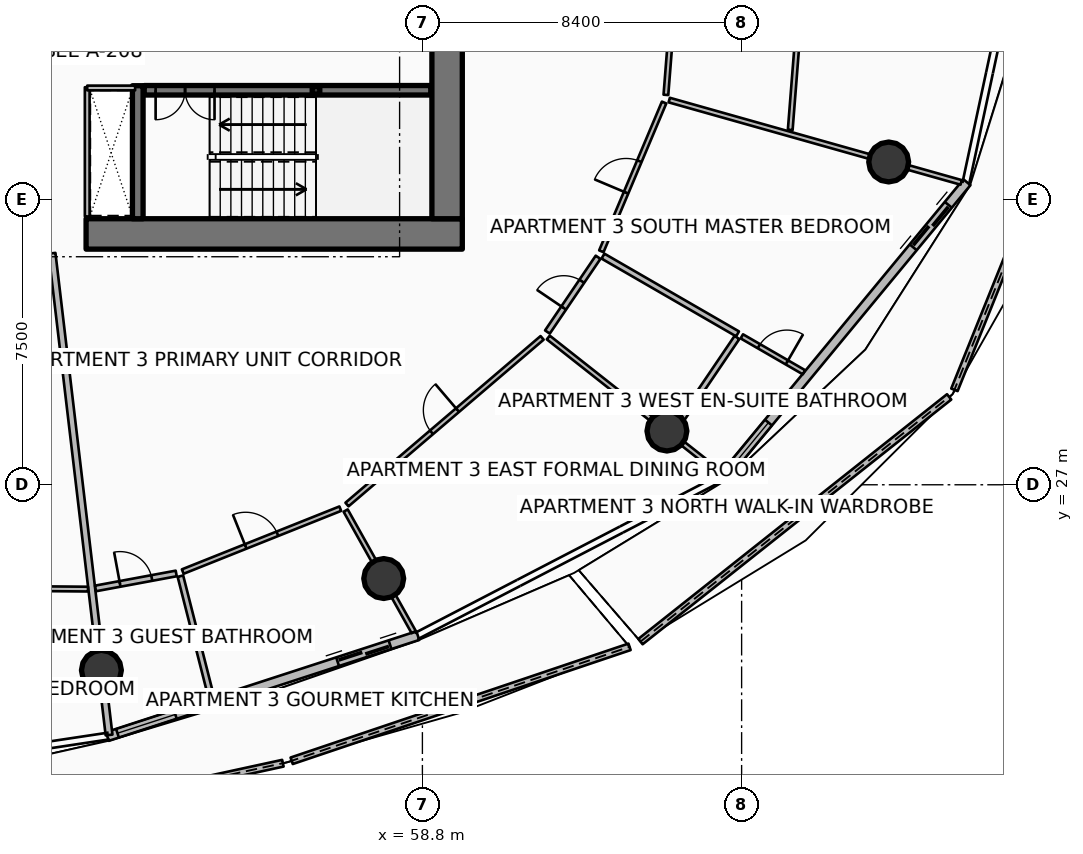
"""IFC4 building model, lengths in metres.
Left out: names, types, materials, properties, quantities, classifications, styles, units other than length and angle.
Written with IfcOpenShell. Run it as: python <this file> out.ifc"""

import sys

from ifc_helpers import new_model, si_unit, direction, frame, frame_2d, origin, origin_2d, place, context, subcontext, project, spatial, polyline, rectangle, hollow_rectangle, circle, outline, extrude, element, fill, save


model = new_model("IFC4")
c1 = context("Model", 3, precision=1e-05, world=origin(), true_north=direction((0.0, 1.0)))
c2 = subcontext(c1, "Body", "Model", "MODEL_VIEW")
j1 = project(units=[si_unit("LENGTHUNIT", "METRE"), si_unit("PLANEANGLEUNIT", "RADIAN")], contexts=[c1])
p1 = place(None, origin())
s1 = spatial("IfcSite", under=j1, at=p1, CompositionType="ELEMENT")
p2 = place(p1, origin())
s2 = spatial("IfcBuilding", under=s1, at=p2, CompositionType="ELEMENT")
p3 = place(p2, frame((0.0, 0.0, 157.8)))
s3 = spatial("IfcBuildingStorey", under=s2, at=p3, CompositionType="ELEMENT", Elevation=157.8)
p4 = place(p3, frame((49.95, 33.6, 0.0), z_axis=(0.0, 0.0, 1.0), x_axis=(1.0, 0.0, 0.0)))
e1 = element("IfcWall", 1, at=p4, inside=s3, PredefinedType="SHEAR", context=c2, shape_type="SweptSolid", body=[
    extrude(rectangle(XDim=9.9, YDim=0.8, at=frame_2d((4.95, 0.0))), origin(), (0.0, 0.0, 1.0), 3.75),
])
p5 = place(p3, frame((59.45, 34.0, 0.0), z_axis=(0.0, 0.0, 1.0), x_axis=(0.0, 1.0, 0.0)))
e2 = element("IfcWall", 2, at=p5, inside=s3, PredefinedType="SHEAR", context=c2, shape_type="SweptSolid", body=[
    extrude(rectangle(XDim=16.0, YDim=0.8, at=frame_2d((8.0, 0.0))), origin(), (0.0, 0.0, 1.0), 3.75),
])
p6 = place(p3, frame((51.31, 34.0, 0.0), z_axis=(0.0, 0.0, 1.0), x_axis=(0.0, 1.0, 0.0)))
e3 = element("IfcWall", 3, at=p6, inside=s3, PredefinedType="SHEAR", context=c2, shape_type="SweptSolid", body=[
    extrude(rectangle(XDim=3.5, YDim=0.28, at=frame_2d((1.75, 0.0))), origin(), (0.0, 0.0, 1.0), 3.75),
])
p7 = place(p3, frame((56.0, 37.38, 0.0), z_axis=(0.0, 0.0, 1.0), x_axis=(1.0, 0.0, 0.0)))
e4 = element("IfcColumn", 4, at=p7, inside=s3, PredefinedType="COLUMN", context=c2, shape_type="SweptSolid", body=[
    extrude(hollow_rectangle(XDim=0.2, YDim=0.2, WallThickness=0.01, InnerFilletRadius=0.01, OuterFilletRadius=0.02, at=origin_2d()), origin(), (0.0, 0.0, 1.0), 1.67),
])
for number, where, z_axis, x_axis in (
    (5, (50.353, 22.119, 0.0), (0.0, 0.0, 1.0), (1.0, 0.0, 0.0)),
    (6, (57.782, 24.533, 0.0), (0.0, 0.0, 1.0), (1.0, 0.0, 0.0)),
    (7, (65.234, 28.414, 0.0), (0.0, 0.0, 1.0), (1.0, 0.0, 0.0)),
    (8, (71.07, 35.494, 0.0), (0.0, 0.0, 1.0), (1.0, 0.0, 0.0)),
):
    element("IfcColumn", number, at=place(p3, frame(where, z_axis=z_axis, x_axis=x_axis)), inside=s3, PredefinedType="COLUMN", context=c2, shape_type="SweptSolid", body=[
        extrude(circle(Radius=0.525, at=origin_2d()), origin(), (0.0, 0.0, 1.0), 3.5),
    ])
p8 = place(p3, frame((46.24, 17.741, 0.0), z_axis=(0.0, 0.0, 1.0), x_axis=(0.977181934864, 0.212404016384, 0.0)))
e9 = element("IfcWall", 9, at=p8, inside=s3, PredefinedType="PARAPET", context=c2, shape_type="SweptSolid", body=[
    extrude(outline(polyline([(0.0, 0.0), (9.096, 0.0), (9.096, 1.348), (4.548, 1.182), (0.0, 1.12), (0.0, 0.0)])), frame((0.0, 0.09, 0.0), z_axis=(0.0, -1.0, 0.0), x_axis=(1.0, 0.0, 0.0)), (0.0, 0.0, 1.0), 0.18),
])
p9 = place(p3, frame((55.36, 19.737, 0.0), z_axis=(0.0, 0.0, 1.0), x_axis=(0.947571676397, 0.319543296113, 0.0)))
e10 = element("IfcWall", 10, at=p9, inside=s3, PredefinedType="PARAPET", context=c2, shape_type="SweptSolid", body=[
    extrude(outline(polyline([(0.0, 0.0), (9.383, 0.0), (9.383, 1.747), (4.691, 1.562), (0.0, 1.348), (0.0, 0.0)])), frame((0.0, 0.09, 0.0), z_axis=(0.0, -1.0, 0.0), x_axis=(1.0, 0.0, 0.0)), (0.0, 0.0, 1.0), 0.18),
])
p10 = place(p3, frame((64.539, 22.874, 0.0), z_axis=(0.0, 0.0, 1.0), x_axis=(0.783643972098, 0.621210209989, 0.0)))
e11 = element("IfcWall", 11, at=p10, inside=s3, PredefinedType="PARAPET", context=c2, shape_type="SweptSolid", body=[
    extrude(outline(polyline([(0.0, 0.0), (10.365, 0.0), (10.365, 1.832), (5.182, 1.853), (0.0, 1.756), (0.0, 0.0)])), frame((0.0, 0.09, 0.0), z_axis=(0.0, -1.0, 0.0), x_axis=(1.0, 0.0, 0.0)), (0.0, 0.0, 1.0), 0.18),
])
p11 = place(p3, frame((72.8, 29.498, 0.0), z_axis=(0.0, 0.0, 1.0), x_axis=(0.373952087888, 0.927448023322, 0.0)))
e12 = element("IfcWall", 12, at=p11, inside=s3, PredefinedType="PARAPET", context=c2, shape_type="SweptSolid", body=[
    extrude(outline(polyline([(0.0, 0.0), (10.84, 0.0), (10.84, 1.497), (5.42, 1.696), (0.0, 1.832), (0.0, 0.0)])), frame((0.0, 0.09, 0.0), z_axis=(0.0, -1.0, 0.0), x_axis=(1.0, 0.0, 0.0)), (0.0, 0.0, 1.0), 0.18),
])
p12 = place(p3, frame((50.51, 20.376, 0.0), z_axis=(0.0, 0.0, 1.0), x_axis=(0.951046390632, 0.309048156224, 0.0)))
e13 = element("IfcWall", 13, at=p12, inside=s3, PredefinedType="SOLIDWALL", context=c2, shape_type="SweptSolid", body=[
    extrude(rectangle(XDim=8.59, YDim=0.24, at=frame_2d((4.295, 0.0))), origin(), (0.0, 0.0, 1.0), 2.45),
])
p13 = place(p12, frame((6.37, 0.0, 0.0)))
e14 = element("IfcOpeningElement", 14, at=p13, cuts=e13, PredefinedType="OPENING", context=c2, shape_type="SweptSolid", body=[
    extrude(rectangle(XDim=1.45, YDim=2.15, at=frame_2d((0.725, 1.075))), frame((0.0, 0.13, 0.0), z_axis=(0.0, -1.0, 0.0), x_axis=(1.0, 0.0, 0.0)), (0.0, 0.0, 1.0), 0.26),
])
p14 = place(p12, frame((0.28, 0.0, 0.65)))
e15 = element("IfcOpeningElement", 15, at=p14, cuts=e13, PredefinedType="OPENING", context=c2, shape_type="SweptSolid", body=[
    extrude(rectangle(XDim=1.6, YDim=1.5, at=frame_2d((0.8, 0.75))), frame((0.0, 0.13, 0.0), z_axis=(0.0, -1.0, 0.0), x_axis=(1.0, 0.0, 0.0)), (0.0, 0.0, 1.0), 0.26),
])
p15 = place(p3, frame((66.709, 27.187, 0.0), z_axis=(0.0, 0.0, 1.0), x_axis=(0.636771922292, 0.77105221547, 0.0)))
e16 = element("IfcWall", 16, at=p15, inside=s3, PredefinedType="SOLIDWALL", context=c2, shape_type="SweptSolid", body=[
    extrude(rectangle(XDim=10.082, YDim=0.24, at=frame_2d((5.041, 0.0))), origin(), (0.0, 0.0, 1.0), 2.45),
])
p16 = place(p15, frame((7.862, 0.0, 0.0)))
e17 = element("IfcOpeningElement", 17, at=p16, cuts=e16, PredefinedType="OPENING", context=c2, shape_type="SweptSolid", body=[
    extrude(rectangle(XDim=1.45, YDim=2.15, at=frame_2d((0.725, 1.075))), frame((0.0, 0.13, 0.0), z_axis=(0.0, -1.0, 0.0), x_axis=(1.0, 0.0, 0.0)), (0.0, 0.0, 1.0), 0.26),
])
p17 = place(p15, frame((0.28, 0.0, 0.65)))
e18 = element("IfcOpeningElement", 18, at=p17, cuts=e16, PredefinedType="OPENING", context=c2, shape_type="SweptSolid", body=[
    extrude(rectangle(XDim=1.6, YDim=1.5, at=frame_2d((0.8, 0.75))), frame((0.0, 0.13, 0.0), z_axis=(0.0, -1.0, 0.0), x_axis=(1.0, 0.0, 0.0)), (0.0, 0.0, 1.0), 0.26),
])
p18 = place(p3, frame((51.48, 37.38, 0.0), z_axis=(0.0, 0.0, 1.0), x_axis=(1.0, 0.0, 0.0)))
e19 = element("IfcWall", 19, at=p18, inside=s3, PredefinedType="SOLIDWALL", context=c2, shape_type="SweptSolid", body=[
    extrude(rectangle(XDim=7.54, YDim=0.25, at=frame_2d((3.77, 0.0))), origin(), (0.0, 0.0, 1.0), 3.5),
])
p19 = place(p18, frame((0.3, 0.0, 0.0)))
e20 = element("IfcOpeningElement", 20, at=p19, cuts=e19, PredefinedType="OPENING", context=c2, shape_type="SweptSolid", body=[
    extrude(rectangle(XDim=1.55, YDim=2.15, at=frame_2d((0.775, 1.075))), frame((0.0, 0.135, 0.0), z_axis=(0.0, -1.0, 0.0), x_axis=(1.0, 0.0, 0.0)), (0.0, 0.0, 1.0), 0.27),
])
p20 = place(p3, frame((49.98, 34.06, 0.0), z_axis=(0.0, 0.0, 1.0), x_axis=(0.0, 1.0, 0.0)))
e21 = element("IfcWall", 21, at=p20, inside=s3, PredefinedType="PARTITIONING", context=c2, shape_type="SweptSolid", body=[
    extrude(rectangle(XDim=3.4, YDim=0.125, at=frame_2d((1.7, 0.0))), origin(), (0.0, 0.0, 1.0), 2.94),
])
p21 = place(p3, frame((49.98, 37.44, 0.0), z_axis=(0.0, 0.0, 1.0), x_axis=(1.0, 0.0, 0.0)))
e22 = element("IfcWall", 22, at=p21, inside=s3, PredefinedType="PARTITIONING", context=c2, shape_type="SweptSolid", body=[
    extrude(rectangle(XDim=1.26, YDim=0.125, at=frame_2d((0.63, 0.0))), origin(), (0.0, 0.0, 1.0), 2.94),
])
p22 = place(p3, frame((49.054, 33.091, 0.0), z_axis=(0.0, 0.0, 1.0), x_axis=(0.117543744731, -0.993067705685, 0.0)))
e23 = element("IfcWall", 23, at=p22, inside=s3, PredefinedType="PARTITIONING", context=c2, shape_type="SweptSolid", body=[
    extrude(rectangle(XDim=12.763, YDim=0.18, at=frame_2d((6.382, 0.0))), origin(), (0.0, 0.0, 1.0), 2.94),
])
p23 = place(p3, frame((45.687, 24.29, 0.0), z_axis=(0.0, 0.0, 1.0), x_axis=(0.999965854942, -0.008263712844, 0.0)))
e24 = element("IfcWall", 24, at=p23, inside=s3, PredefinedType="PARTITIONING", context=c2, shape_type="SweptSolid", body=[
    extrude(rectangle(XDim=4.313, YDim=0.125, at=frame_2d((2.157, 0.0))), origin(), (0.0, 0.0, 1.0), 2.94),
])
p24 = place(p23, frame((1.707, 0.0, 0.0)))
e25 = element("IfcOpeningElement", 25, at=p24, cuts=e24, PredefinedType="OPENING", context=c2, shape_type="SweptSolid", body=[
    extrude(rectangle(XDim=0.9, YDim=2.08, at=frame_2d((0.45, 1.04))), frame((0.0, 0.073, 0.0), z_axis=(0.0, -1.0, 0.0), x_axis=(1.0, 0.0, 0.0)), (0.0, 0.0, 1.0), 0.145),
])
p25 = place(p3, frame((50.199, 24.272, 0.0), z_axis=(0.0, 0.0, 1.0), x_axis=(0.98320468223, 0.182506309042, 0.0)))
e26 = element("IfcWall", 26, at=p25, inside=s3, PredefinedType="PARTITIONING", context=c2, shape_type="SweptSolid", body=[
    extrude(rectangle(XDim=2.159, YDim=0.15, at=frame_2d((1.08, 0.0))), origin(), (0.0, 0.0, 1.0), 2.94),
])
p26 = place(p25, frame((0.655, 0.0, 0.0)))
e27 = element("IfcOpeningElement", 27, at=p26, cuts=e26, PredefinedType="OPENING", context=c2, shape_type="SweptSolid", body=[
    extrude(rectangle(XDim=0.85, YDim=2.06, at=frame_2d((0.425, 1.03))), frame((0.0, 0.085, 0.0), z_axis=(0.0, -1.0, 0.0), x_axis=(1.0, 0.0, 0.0)), (0.0, 0.0, 1.0), 0.17),
])
p27 = place(p3, frame((52.432, 24.595, 0.0), z_axis=(0.0, 0.0, 1.0), x_axis=(0.246779038105, -0.969071775645, 0.0)))
e28 = element("IfcWall", 28, at=p27, inside=s3, PredefinedType="PARTITIONING", context=c2, shape_type="SweptSolid", body=[
    extrude(rectangle(XDim=3.301, YDim=0.15, at=frame_2d((1.651, 0.0))), origin(), (0.0, 0.0, 1.0), 2.94),
])
p28 = place(p3, frame((52.494, 24.716, 0.0), z_axis=(0.0, 0.0, 1.0), x_axis=(0.928695316587, 0.370843644882, 0.0)))
e29 = element("IfcWall", 29, at=p28, inside=s3, PredefinedType="PARTITIONING", context=c2, shape_type="SweptSolid", body=[
    extrude(rectangle(XDim=4.464, YDim=0.125, at=frame_2d((2.232, 0.0))), origin(), (0.0, 0.0, 1.0), 2.94),
])
p29 = place(p28, frame((1.782, 0.0, 0.0)))
e30 = element("IfcOpeningElement", 30, at=p29, cuts=e29, PredefinedType="OPENING", context=c2, shape_type="SweptSolid", body=[
    extrude(rectangle(XDim=0.9, YDim=2.08, at=frame_2d((0.45, 1.04))), frame((0.0, 0.073, 0.0), z_axis=(0.0, -1.0, 0.0), x_axis=(1.0, 0.0, 0.0)), (0.0, 0.0, 1.0), 0.145),
])
p30 = place(p3, frame((56.781, 26.321, 0.0), z_axis=(0.0, 0.0, 1.0), x_axis=(0.488615541235, -0.872499199348, 0.0)))
e31 = element("IfcWall", 31, at=p30, inside=s3, PredefinedType="PARTITIONING", context=c2, shape_type="SweptSolid", body=[
    extrude(rectangle(XDim=3.665, YDim=0.125, at=frame_2d((1.832, 0.0))), origin(), (0.0, 0.0, 1.0), 2.94),
])
p31 = place(p3, frame((56.815, 26.48, 0.0), z_axis=(0.0, 0.0, 1.0), x_axis=(0.760406411553, 0.649447526186, 0.0)))
e32 = element("IfcWall", 32, at=p31, inside=s3, PredefinedType="PARTITIONING", context=c2, shape_type="SweptSolid", body=[
    extrude(rectangle(XDim=6.753, YDim=0.125, at=frame_2d((3.376, 0.0))), origin(), (0.0, 0.0, 1.0), 2.94),
])
p32 = place(p31, frame((2.926, 0.0, 0.0)))
e33 = element("IfcOpeningElement", 33, at=p32, cuts=e32, PredefinedType="OPENING", context=c2, shape_type="SweptSolid", body=[
    extrude(rectangle(XDim=0.9, YDim=2.08, at=frame_2d((0.45, 1.04))), frame((0.0, 0.073, 0.0), z_axis=(0.0, -1.0, 0.0), x_axis=(1.0, 0.0, 0.0)), (0.0, 0.0, 1.0), 0.145),
])
p33 = place(p3, frame((62.112, 30.875, 0.0), z_axis=(0.0, 0.0, 1.0), x_axis=(0.785328664081, -0.619079065526, 0.0)))
e34 = element("IfcWall", 34, at=p33, inside=s3, PredefinedType="PARTITIONING", context=c2, shape_type="SweptSolid", body=[
    extrude(rectangle(XDim=5.87, YDim=0.125, at=frame_2d((2.935, 0.0))), origin(), (0.0, 0.0, 1.0), 2.94),
])
p34 = place(p3, frame((62.09, 31.02, 0.0), z_axis=(0.0, 0.0, 1.0), x_axis=(0.561179778306, 0.827693938857, 0.0)))
e35 = element("IfcWall", 35, at=p34, inside=s3, PredefinedType="PARTITIONING", context=c2, shape_type="SweptSolid", body=[
    extrude(rectangle(XDim=2.376, YDim=0.15, at=frame_2d((1.188, 0.0))), origin(), (0.0, 0.0, 1.0), 2.94),
])
p35 = place(p34, frame((0.763, 0.0, 0.0)))
e36 = element("IfcOpeningElement", 36, at=p35, cuts=e35, PredefinedType="OPENING", context=c2, shape_type="SweptSolid", body=[
    extrude(rectangle(XDim=0.85, YDim=2.06, at=frame_2d((0.425, 1.03))), frame((0.0, 0.085, 0.0), z_axis=(0.0, -1.0, 0.0), x_axis=(1.0, 0.0, 0.0)), (0.0, 0.0, 1.0), 0.17),
])
p36 = place(p3, frame((65.404, 28.407, 0.0), z_axis=(0.0, 0.0, 1.0), x_axis=(0.561106969612, 0.827743298767, 0.0)))
e37 = element("IfcWall", 37, at=p36, inside=s3, PredefinedType="PARTITIONING", context=c2, shape_type="SweptSolid", body=[
    extrude(rectangle(XDim=2.982, YDim=0.15, at=frame_2d((1.491, 0.0))), origin(), (0.0, 0.0, 1.0), 2.94),
])
p37 = place(p3, frame((63.552, 33.016, 0.0), z_axis=(0.0, 0.0, 1.0), x_axis=(0.865897249189, -0.500221904605, 0.0)))
e38 = element("IfcWall", 38, at=p37, inside=s3, PredefinedType="PARTITIONING", context=c2, shape_type="SweptSolid", body=[
    extrude(rectangle(XDim=4.09, YDim=0.15, at=frame_2d((2.045, 0.0))), origin(), (0.0, 0.0, 1.0), 2.94),
])
p38 = place(p3, frame((67.206, 30.905, 0.0), z_axis=(0.0, 0.0, 1.0), x_axis=(0.865877522555, -0.500256050372, 0.0)))
e39 = element("IfcWall", 39, at=p38, inside=s3, PredefinedType="PARTITIONING", context=c2, shape_type="SweptSolid", body=[
    extrude(rectangle(XDim=1.888, YDim=0.125, at=frame_2d((0.944, 0.0))), origin(), (0.0, 0.0, 1.0), 2.94),
])
p39 = place(p38, frame((0.519, 0.0, 0.0)))
e40 = element("IfcOpeningElement", 40, at=p39, cuts=e39, PredefinedType="OPENING", context=c2, shape_type="SweptSolid", body=[
    extrude(rectangle(XDim=0.85, YDim=2.06, at=frame_2d((0.425, 1.03))), frame((0.0, 0.073, 0.0), z_axis=(0.0, -1.0, 0.0), x_axis=(1.0, 0.0, 0.0)), (0.0, 0.0, 1.0), 0.145),
])
p40 = place(p3, frame((63.509, 33.144, 0.0), z_axis=(0.0, 0.0, 1.0), x_axis=(0.38881485578, 0.921315911034, 0.0)))
e41 = element("IfcWall", 41, at=p40, inside=s3, PredefinedType="PARTITIONING", context=c2, shape_type="SweptSolid", body=[
    extrude(rectangle(XDim=4.248, YDim=0.125, at=frame_2d((2.124, 0.0))), origin(), (0.0, 0.0, 1.0), 2.94),
])
p41 = place(p40, frame((1.674, 0.0, 0.0)))
e42 = element("IfcOpeningElement", 42, at=p41, cuts=e41, PredefinedType="OPENING", context=c2, shape_type="SweptSolid", body=[
    extrude(rectangle(XDim=0.9, YDim=2.08, at=frame_2d((0.45, 1.04))), frame((0.0, 0.073, 0.0), z_axis=(0.0, -1.0, 0.0), x_axis=(1.0, 0.0, 0.0)), (0.0, 0.0, 1.0), 0.145),
])
p42 = place(p3, frame((65.295, 37.122, 0.0), z_axis=(0.0, 0.0, 1.0), x_axis=(0.962453364466, -0.271447087346, 0.0)))
e43 = element("IfcWall", 43, at=p42, inside=s3, PredefinedType="PARTITIONING", context=c2, shape_type="SweptSolid", body=[
    extrude(rectangle(XDim=7.981, YDim=0.125, at=frame_2d((3.991, 0.0))), origin(), (0.0, 0.0, 1.0), 2.94),
])
p43 = place(p3, frame((65.208, 37.259, 0.0), z_axis=(0.0, 0.0, 1.0), x_axis=(0.078457580711, 0.996917452966, 0.0)))
e44 = element("IfcWall", 44, at=p43, inside=s3, PredefinedType="PARTITIONING", context=c2, shape_type="SweptSolid", body=[
    extrude(rectangle(XDim=6.752, YDim=0.125, at=frame_2d((3.376, 0.0))), origin(), (0.0, 0.0, 1.0), 2.94),
])
p44 = place(p43, frame((2.926, 0.0, 0.0)))
e45 = element("IfcOpeningElement", 45, at=p44, cuts=e44, PredefinedType="OPENING", context=c2, shape_type="SweptSolid", body=[
    extrude(rectangle(XDim=0.9, YDim=2.08, at=frame_2d((0.45, 1.04))), frame((0.0, 0.073, 0.0), z_axis=(0.0, -1.0, 0.0), x_axis=(1.0, 0.0, 0.0)), (0.0, 0.0, 1.0), 0.145),
])
p45 = place(p3, frame((68.479, 36.336, 0.0), z_axis=(0.0, 0.0, 1.0), x_axis=(0.078482765766, 0.996915470578, 0.0)))
e46 = element("IfcWall", 46, at=p45, inside=s3, PredefinedType="PARTITIONING", context=c2, shape_type="SweptSolid", body=[
    extrude(rectangle(XDim=8.079, YDim=0.125, at=frame_2d((4.039, 0.0))), origin(), (0.0, 0.0, 1.0), 2.94),
])
p46 = place(p45, frame((3.589, 0.0, 0.0)))
e47 = element("IfcOpeningElement", 47, at=p46, cuts=e46, PredefinedType="OPENING", context=c2, shape_type="SweptSolid", body=[
    extrude(rectangle(XDim=0.9, YDim=2.08, at=frame_2d((0.45, 1.04))), frame((0.0, 0.073, 0.0), z_axis=(0.0, -1.0, 0.0), x_axis=(1.0, 0.0, 0.0)), (0.0, 0.0, 1.0), 0.145),
])
p47 = place(p13, origin())
e48 = element("IfcDoor", 48, at=p47, inside=s3, OperationType="DOUBLE_DOOR_SLIDING", PredefinedType="DOOR", context=c2, shape_type="SweptSolid", body=[
    extrude(rectangle(XDim=1.45, YDim=2.15, at=frame_2d((0.725, 1.075))), frame((0.0, 0.025, 0.0), z_axis=(0.0, -1.0, 0.0), x_axis=(1.0, 0.0, 0.0)), (0.0, 0.0, 1.0), 0.05),
])
fill(e14, e48)
p48 = place(p14, origin())
e49 = element("IfcWindow", 49, at=p48, inside=s3, PartitioningType="SINGLE_PANEL", PredefinedType="WINDOW", context=c2, shape_type="SweptSolid", body=[
    extrude(rectangle(XDim=1.6, YDim=1.5, at=frame_2d((0.8, 0.75))), frame((0.0, 0.03, 0.0), z_axis=(0.0, -1.0, 0.0), x_axis=(1.0, 0.0, 0.0)), (0.0, 0.0, 1.0), 0.06),
])
fill(e15, e49)
p49 = place(p16, origin())
e50 = element("IfcDoor", 50, at=p49, inside=s3, OperationType="DOUBLE_DOOR_SLIDING", PredefinedType="DOOR", context=c2, shape_type="SweptSolid", body=[
    extrude(rectangle(XDim=1.45, YDim=2.15, at=frame_2d((0.725, 1.075))), frame((0.0, 0.025, 0.0), z_axis=(0.0, -1.0, 0.0), x_axis=(1.0, 0.0, 0.0)), (0.0, 0.0, 1.0), 0.05),
])
fill(e17, e50)
p50 = place(p17, origin())
e51 = element("IfcWindow", 51, at=p50, inside=s3, PartitioningType="SINGLE_PANEL", PredefinedType="WINDOW", context=c2, shape_type="SweptSolid", body=[
    extrude(rectangle(XDim=1.6, YDim=1.5, at=frame_2d((0.8, 0.75))), frame((0.0, 0.03, 0.0), z_axis=(0.0, -1.0, 0.0), x_axis=(1.0, 0.0, 0.0)), (0.0, 0.0, 1.0), 0.06),
])
fill(e18, e51)
p51 = place(p19, origin())
e52 = element("IfcDoor", 52, at=p51, inside=s3, OperationType="DOUBLE_DOOR_SINGLE_SWING", PredefinedType="DOOR", context=c2, shape_type="SweptSolid", body=[
    extrude(rectangle(XDim=1.55, YDim=2.15, at=frame_2d((0.775, 1.075))), frame((0.0, 0.025, 0.0), z_axis=(0.0, -1.0, 0.0), x_axis=(1.0, 0.0, 0.0)), (0.0, 0.0, 1.0), 0.05),
])
fill(e20, e52)
p52 = place(p26, origin())
e53 = element("IfcDoor", 53, at=p52, inside=s3, OperationType="SINGLE_SWING_LEFT", PredefinedType="DOOR", context=c2, shape_type="SweptSolid", body=[
    extrude(rectangle(XDim=0.85, YDim=2.06, at=frame_2d((0.425, 1.03))), frame((0.0, 0.025, 0.0), z_axis=(0.0, -1.0, 0.0), x_axis=(1.0, 0.0, 0.0)), (0.0, 0.0, 1.0), 0.05),
])
fill(e27, e53)
p53 = place(p29, origin())
e54 = element("IfcDoor", 54, at=p53, inside=s3, OperationType="SINGLE_SWING_LEFT", PredefinedType="DOOR", context=c2, shape_type="SweptSolid", body=[
    extrude(rectangle(XDim=0.9, YDim=2.08, at=frame_2d((0.45, 1.04))), frame((0.0, 0.025, 0.0), z_axis=(0.0, -1.0, 0.0), x_axis=(1.0, 0.0, 0.0)), (0.0, 0.0, 1.0), 0.05),
])
fill(e30, e54)
p54 = place(p32, origin())
e55 = element("IfcDoor", 55, at=p54, inside=s3, OperationType="SINGLE_SWING_RIGHT", PredefinedType="DOOR", context=c2, shape_type="SweptSolid", body=[
    extrude(rectangle(XDim=0.9, YDim=2.08, at=frame_2d((0.45, 1.04))), frame((0.0, 0.025, 0.0), z_axis=(0.0, -1.0, 0.0), x_axis=(1.0, 0.0, 0.0)), (0.0, 0.0, 1.0), 0.05),
])
fill(e33, e55)
p55 = place(p35, origin())
e56 = element("IfcDoor", 56, at=p55, inside=s3, OperationType="SINGLE_SWING_LEFT", PredefinedType="DOOR", context=c2, shape_type="SweptSolid", body=[
    extrude(rectangle(XDim=0.85, YDim=2.06, at=frame_2d((0.425, 1.03))), frame((0.0, 0.025, 0.0), z_axis=(0.0, -1.0, 0.0), x_axis=(1.0, 0.0, 0.0)), (0.0, 0.0, 1.0), 0.05),
])
fill(e36, e56)
p56 = place(p39, origin())
e57 = element("IfcDoor", 57, at=p56, inside=s3, OperationType="SINGLE_SWING_RIGHT", PredefinedType="DOOR", context=c2, shape_type="SweptSolid", body=[
    extrude(rectangle(XDim=0.85, YDim=2.06, at=frame_2d((0.425, 1.03))), frame((0.0, 0.025, 0.0), z_axis=(0.0, -1.0, 0.0), x_axis=(1.0, 0.0, 0.0)), (0.0, 0.0, 1.0), 0.05),
])
fill(e40, e57)
p57 = place(p41, origin())
e58 = element("IfcDoor", 58, at=p57, inside=s3, OperationType="SINGLE_SWING_LEFT", PredefinedType="DOOR", context=c2, shape_type="SweptSolid", body=[
    extrude(rectangle(XDim=0.9, YDim=2.08, at=frame_2d((0.45, 1.04))), frame((0.0, 0.025, 0.0), z_axis=(0.0, -1.0, 0.0), x_axis=(1.0, 0.0, 0.0)), (0.0, 0.0, 1.0), 0.05),
])
fill(e42, e58)
save(model, sys.argv[1])
